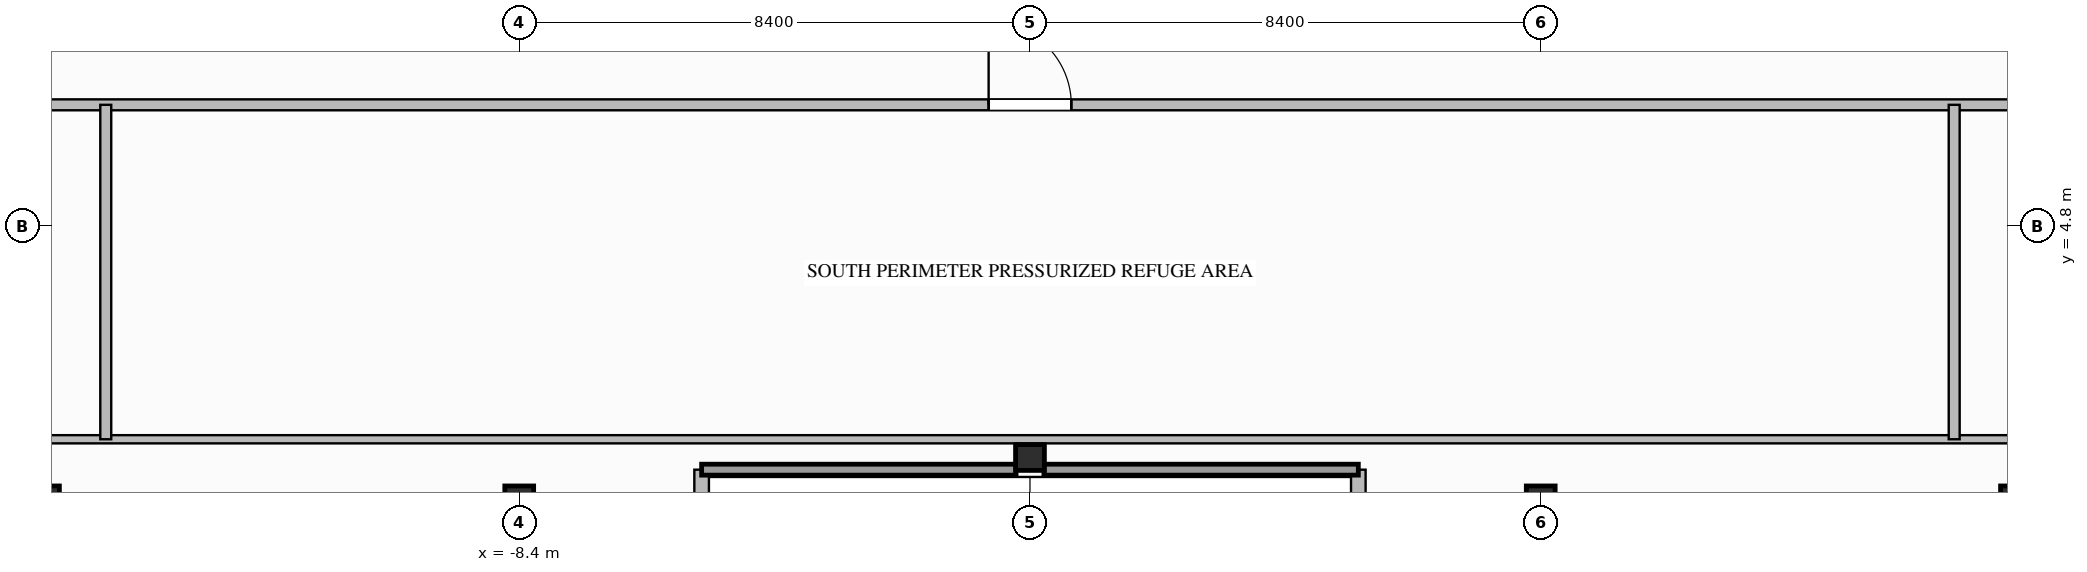
"""IFC4 building model, lengths in metres.
Left out: names, types, materials, properties, quantities, classifications, styles, units other than length and angle.
Written with IfcOpenShell. Run it as: python <this file> out.ifc"""

import sys

from ifc_helpers import new_model, si_unit, direction, frame, frame_2d, origin, origin_2d, place, context, subcontext, project, spatial, rectangle, i_section, extrude, element, fill, save


model = new_model("IFC4")
c1 = context("Model", 3, precision=1e-05, world=origin(), true_north=direction((0.0, 1.0)))
c2 = subcontext(c1, "Body", "Model", "MODEL_VIEW")
j1 = project(units=[si_unit("LENGTHUNIT", "METRE"), si_unit("PLANEANGLEUNIT", "RADIAN")], contexts=[c1])
p1 = place(None, origin())
s1 = spatial("IfcSite", under=j1, at=p1, CompositionType="ELEMENT")
p2 = place(p1, origin())
s2 = spatial("IfcBuilding", under=s1, at=p2, CompositionType="ELEMENT")
p3 = place(p2, frame((0.0, 0.0, 82.2)))
s3 = spatial("IfcBuildingStorey", under=s2, at=p3, CompositionType="ELEMENT", Elevation=82.2)
for number, where, z_axis, x_axis in (
    (1, (-16.2, 0.32, 0.0), (0.0, 0.0, 1.0), (0.0, 1.0, 0.0)),
    (2, (-8.4, 0.32, 0.0), (0.0, 0.0, 1.0), (0.0, 1.0, 0.0)),
    (3, (0.0, 1.0, 0.0), (0.0, 0.0, 1.0), (0.0, 1.0, 0.0)),
    (4, (8.4, 0.32, 0.0), (0.0, 0.0, 1.0), (0.0, 1.0, 0.0)),
    (5, (16.2, 0.32, 0.0), (0.0, 0.0, 1.0), (0.0, 1.0, 0.0)),
):
    element("IfcColumn", number, at=place(p3, frame(where, z_axis=z_axis, x_axis=x_axis)), inside=s3, PredefinedType="COLUMN", context=c2, shape_type="SweptSolid", body=[
        extrude(i_section(OverallWidth=0.424, OverallDepth=0.474, WebThickness=0.048, FlangeThickness=0.077, FilletRadius=0.03, at=origin_2d()), origin(), (0.0, 0.0, 1.0), 4.997),
    ])
for number, where, z_axis, x_axis in (
    (6, (5.4, 0.12, 0.0), (0.0, 0.0, 1.0), (0.0, 1.0, 0.0)),
    (7, (-5.4, 0.8, 0.0), (0.0, 0.0, 1.0), (0.0, -1.0, 0.0)),
):
    element("IfcWall", number, at=place(p3, frame(where, z_axis=z_axis, x_axis=x_axis)), inside=s3, PredefinedType="STANDARD", context=c2, shape_type="SweptSolid", body=[
        extrude(rectangle(XDim=0.68, YDim=0.24, at=frame_2d((0.34, 0.0))), origin(), (0.0, 0.0, 1.0), 4.7),
    ])
p4 = place(p3, frame((-19.95, 1.3, 0.0), z_axis=(0.0, 0.0, 1.0), x_axis=(1.0, 0.0, 0.0)))
e8 = element("IfcWall", 8, at=p4, inside=s3, PredefinedType="PARTITIONING", context=c2, shape_type="SweptSolid", body=[
    extrude(rectangle(XDim=39.9, YDim=0.135, at=frame_2d((19.95, 0.0))), origin(), (0.0, 0.0, 1.0), 4.074),
])
p5 = place(p3, frame((-19.95, 6.8, 0.0), z_axis=(0.0, 0.0, 1.0), x_axis=(1.0, 0.0, 0.0)))
e9 = element("IfcWall", 9, at=p5, inside=s3, PredefinedType="SOLIDWALL", context=c2, shape_type="SweptSolid", body=[
    extrude(rectangle(XDim=39.9, YDim=0.18, at=frame_2d((19.95, 0.0))), origin(), (0.0, 0.0, 1.0), 4.7),
])
p6 = place(p5, frame((19.27, 0.0, 0.0)))
e10 = element("IfcOpeningElement", 10, at=p6, cuts=e9, PredefinedType="OPENING", context=c2, shape_type="SweptSolid", body=[
    extrude(rectangle(XDim=1.36, YDim=2.2, at=frame_2d((0.68, 1.1))), frame((0.0, 0.1, 0.0), z_axis=(0.0, -1.0, 0.0), x_axis=(1.0, 0.0, 0.0)), (0.0, 0.0, 1.0), 0.2),
])
for number, where, z_axis, x_axis in (
    (11, (-15.2, 1.3, 0.0), (0.0, 0.0, 1.0), (0.0, 1.0, 0.0)),
    (12, (15.2, 1.3, 0.0), (0.0, 0.0, 1.0), (0.0, 1.0, 0.0)),
):
    element("IfcWall", number, at=place(p3, frame(where, z_axis=z_axis, x_axis=x_axis)), inside=s3, PredefinedType="SOLIDWALL", context=c2, shape_type="SweptSolid", body=[
        extrude(rectangle(XDim=5.5, YDim=0.18, at=frame_2d((2.75, 0.0))), origin(), (0.0, 0.0, 1.0), 4.7),
    ])
p7 = place(p6, origin())
e13 = element("IfcDoor", 13, at=p7, inside=s3, OperationType="SINGLE_SWING_LEFT", PredefinedType="DOOR", context=c2, shape_type="SweptSolid", body=[
    extrude(rectangle(XDim=1.36, YDim=2.2, at=frame_2d((0.68, 1.1))), frame((0.0, 0.025, 0.0), z_axis=(0.0, -1.0, 0.0), x_axis=(1.0, 0.0, 0.0)), (0.0, 0.0, 1.0), 0.05),
])
fill(e10, e13)
save(model, sys.argv[1])
